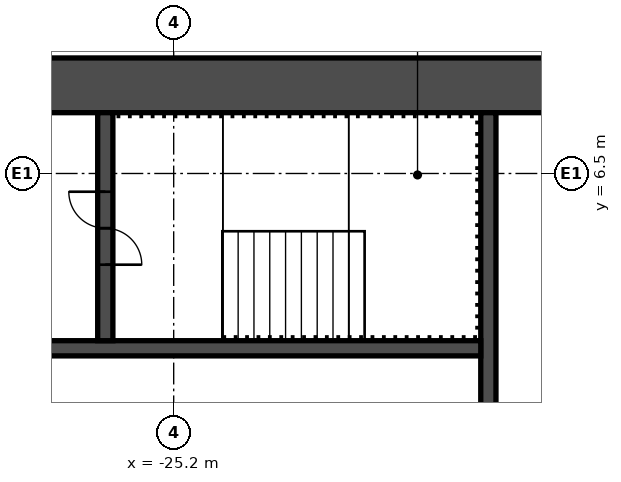
"""IFC4 building model, lengths in metres.
Left out: names, types, materials, properties, quantities, classifications, styles, units other than length and angle.
Written with IfcOpenShell. Run it as: python <this file> out.ifc"""

import sys

from ifc_helpers import new_model, si_unit, direction, frame, frame_2d, origin, place, context, subcontext, project, spatial, rectangle, extrude, element, fill, save


model = new_model("IFC4")
c1 = context("Model", 3, precision=1e-05, world=origin(), true_north=direction((0.0, 1.0)))
c2 = subcontext(c1, "Body", "Model", "MODEL_VIEW")
j1 = project(units=[si_unit("LENGTHUNIT", "METRE"), si_unit("PLANEANGLEUNIT", "RADIAN")], contexts=[c1])
p1 = place(None, origin())
s1 = spatial("IfcSite", under=j1, at=p1, CompositionType="ELEMENT")
p2 = place(p1, origin())
s2 = spatial("IfcBuilding", under=s1, at=p2, CompositionType="ELEMENT")
p3 = place(p2, frame((0.0, 0.0, 81.8)))
s3 = spatial("IfcBuildingStorey", under=s2, at=p3, CompositionType="ELEMENT", Elevation=81.8)
p4 = place(p3, frame((-32.7, 7.95, 0.0), z_axis=(0.0, 0.0, 1.0), x_axis=(1.0, 0.0, 0.0)))
e1 = element("IfcWall", 1, at=p4, inside=s3, PredefinedType="SHEAR", context=c2, shape_type="SweptSolid", body=[
    extrude(rectangle(XDim=15.0, YDim=0.9, at=frame_2d((7.5, 0.0))), origin(), (0.0, 0.0, 1.0), 2.8),
])
p5 = place(p4, frame((3.4, 0.0, 0.0)))
e2 = element("IfcOpeningElement", 2, at=p5, cuts=e1, PredefinedType="OPENING", context=c2, shape_type="SweptSolid", body=[
    extrude(rectangle(XDim=1.2, YDim=2.1, at=frame_2d((0.6, 1.05))), frame((0.0, 0.46, 0.0), z_axis=(0.0, -1.0, 0.0), x_axis=(1.0, 0.0, 0.0)), (0.0, 0.0, 1.0), 0.92),
])
p6 = place(p4, frame((0.75, 0.0, 0.0)))
e3 = element("IfcOpeningElement", 3, at=p6, cuts=e1, PredefinedType="OPENING", context=c2, shape_type="SweptSolid", body=[
    extrude(rectangle(XDim=0.9, YDim=2.1, at=frame_2d((0.45, 1.05))), frame((0.0, 0.46, 0.0), z_axis=(0.0, -1.0, 0.0), x_axis=(1.0, 0.0, 0.0)), (0.0, 0.0, 1.0), 0.92),
])
p7 = place(p3, frame((-20.025, 1.2, 0.0), z_axis=(0.0, 0.0, 1.0), x_axis=(0.0, 1.0, 0.0)))
e4 = element("IfcWall", 4, at=p7, inside=s3, PredefinedType="SHEAR", context=c2, shape_type="SweptSolid", body=[
    extrude(rectangle(XDim=6.3, YDim=0.25, at=frame_2d((3.15, 0.0))), origin(), (0.0, 0.0, 1.0), 2.8),
])
p8 = place(p3, frame((-27.65, 3.625, 0.0), z_axis=(0.0, 0.0, 1.0), x_axis=(1.0, 0.0, 0.0)))
e5 = element("IfcWall", 5, at=p8, inside=s3, PredefinedType="SHEAR", context=c2, shape_type="SweptSolid", body=[
    extrude(rectangle(XDim=7.5, YDim=0.25, at=frame_2d((3.75, 0.0))), origin(), (0.0, 0.0, 1.0), 2.8),
])
p9 = place(p3, frame((-26.325, 3.75, 0.0), z_axis=(0.0, 0.0, 1.0), x_axis=(0.0, 1.0, 0.0)))
e6 = element("IfcWall", 6, at=p9, inside=s3, PredefinedType="SHEAR", context=c2, shape_type="SweptSolid", body=[
    extrude(rectangle(XDim=3.75, YDim=0.25, at=frame_2d((1.875, 0.0))), origin(), (0.0, 0.0, 1.0), 2.8),
])
p10 = place(p9, frame((1.25, 0.0, 0.0)))
e7 = element("IfcOpeningElement", 7, at=p10, cuts=e6, PredefinedType="OPENING", context=c2, shape_type="SweptSolid", body=[
    extrude(rectangle(XDim=1.2, YDim=2.1, at=frame_2d((0.6, 1.05))), frame((0.0, 0.135, 0.0), z_axis=(0.0, -1.0, 0.0), x_axis=(1.0, 0.0, 0.0)), (0.0, 0.0, 1.0), 0.27),
])
p11 = place(p10, origin())
e8 = element("IfcDoor", 8, at=p11, inside=s3, OperationType="DOUBLE_DOOR_SINGLE_SWING", PredefinedType="DOOR", context=c2, shape_type="SweptSolid", body=[
    extrude(rectangle(XDim=1.2, YDim=2.1, at=frame_2d((0.6, 1.05))), frame((0.0, 0.025, 0.0), z_axis=(0.0, -1.0, 0.0), x_axis=(1.0, 0.0, 0.0)), (0.0, 0.0, 1.0), 0.05),
])
fill(e7, e8)
save(model, sys.argv[1])
